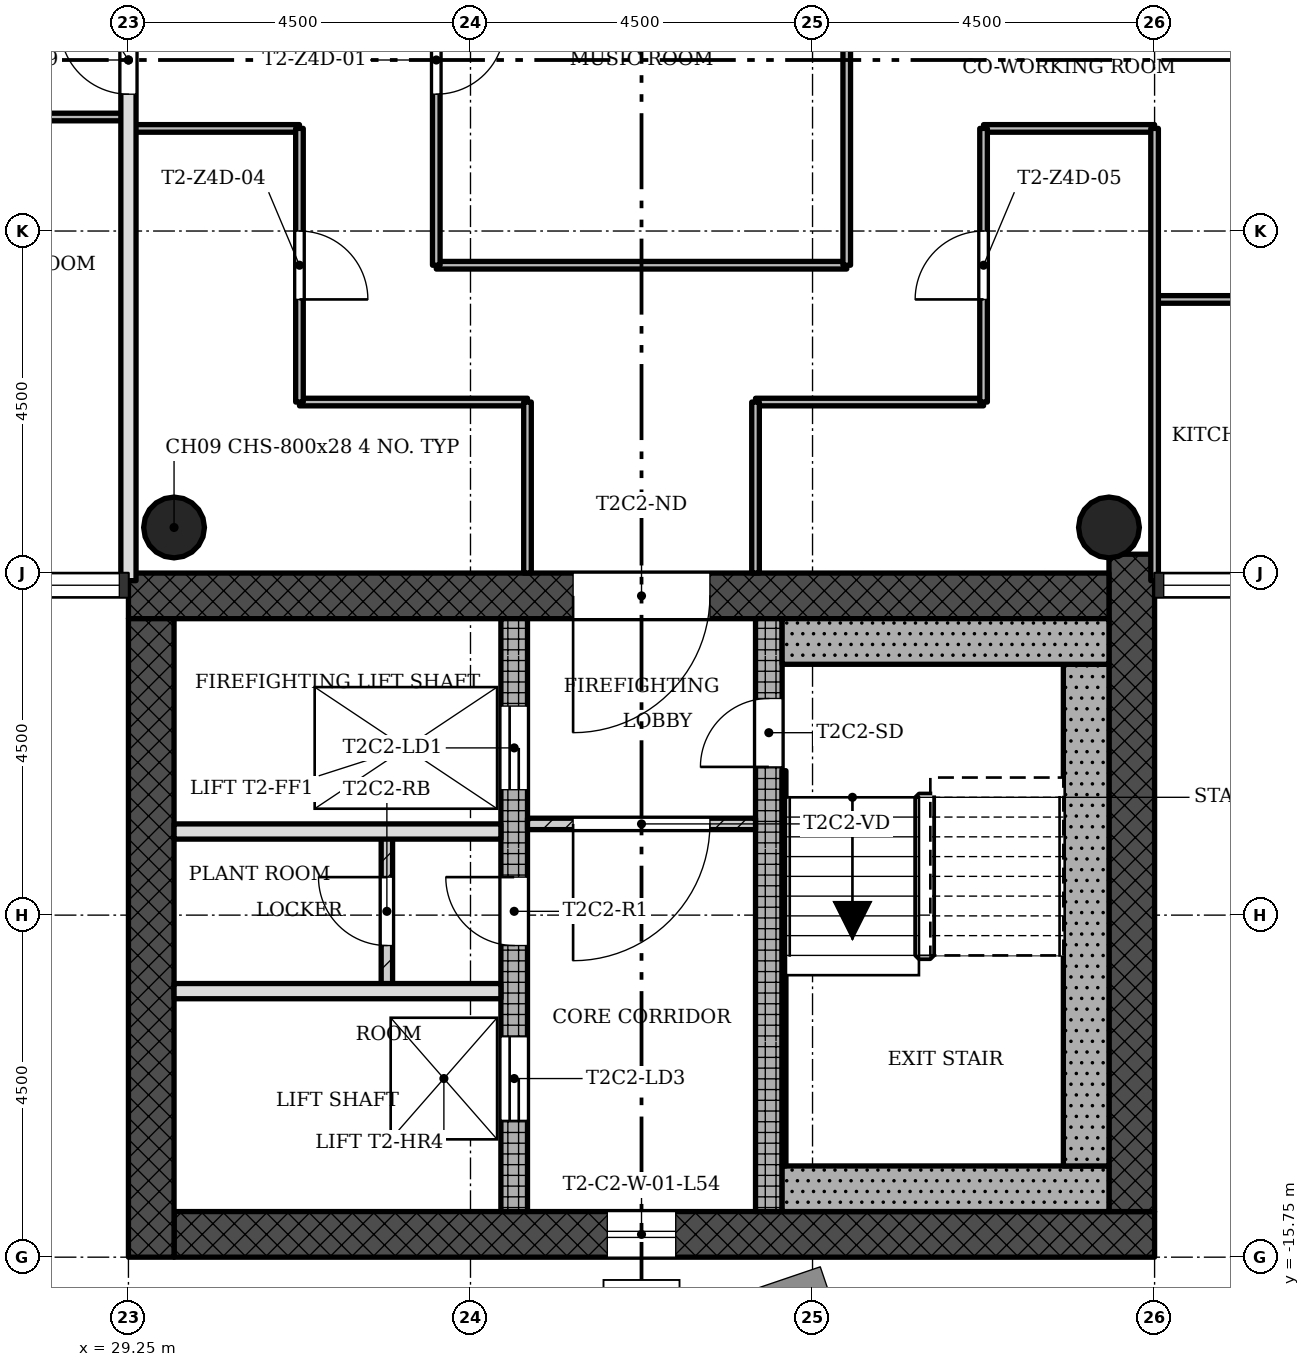
"""IFC4 building model, lengths in metres.
Left out: names, types, materials, properties, quantities, classifications, styles, units other than length and angle.
Written with IfcOpenShell. Run it as: python <this file> out.ifc"""

import sys

from ifc_helpers import new_model, si_unit, direction, frame, frame_2d, origin, origin_2d, place, context, subcontext, project, spatial, rectangle, hollow_circle, extrude, element, fill, save


model = new_model("IFC4")
c1 = context("Model", 3, precision=1e-05, world=origin(), true_north=direction((0.0, 1.0)))
c2 = subcontext(c1, "Body", "Model", "MODEL_VIEW")
j1 = project(units=[si_unit("LENGTHUNIT", "METRE"), si_unit("PLANEANGLEUNIT", "RADIAN")], contexts=[c1])
p1 = place(None, origin())
s1 = spatial("IfcSite", under=j1, at=p1, CompositionType="ELEMENT")
p2 = place(p1, origin())
s2 = spatial("IfcBuilding", under=s1, at=p2, CompositionType="ELEMENT")
p3 = place(p2, frame((0.0, 0.0, 196.0)))
s3 = spatial("IfcBuildingStorey", under=s2, at=p3, CompositionType="ELEMENT", Elevation=196.0)
p4 = place(p3, frame((29.85, -15.45, 0.0), z_axis=(0.0, 0.0, 1.0), x_axis=(1.0, 0.0, 0.0)))
e1 = element("IfcWall", 1, at=p4, inside=s3, PredefinedType="SHEAR", context=c2, shape_type="SweptSolid", body=[
    extrude(rectangle(XDim=12.9, YDim=0.6, at=frame_2d((6.45, 0.0))), origin(), (0.0, 0.0, 1.0), 3.4),
])
p5 = place(p4, frame((5.7, 0.0, 0.45)))
e2 = element("IfcOpeningElement", 2, at=p5, cuts=e1, PredefinedType="OPENING", context=c2, shape_type="SweptSolid", body=[
    extrude(rectangle(XDim=0.9, YDim=2.4, at=frame_2d((0.45, 1.2))), frame((0.0, 0.31, 0.0), z_axis=(0.0, -1.0, 0.0), x_axis=(1.0, 0.0, 0.0)), (0.0, 0.0, 1.0), 0.62),
])
p6 = place(p3, frame((42.45, -15.15, 0.0), z_axis=(0.0, 0.0, 1.0), x_axis=(0.0, 1.0, 0.0)))
e3 = element("IfcWall", 3, at=p6, inside=s3, PredefinedType="SHEAR", context=c2, shape_type="SweptSolid", body=[
    extrude(rectangle(XDim=8.648, YDim=0.6, at=frame_2d((4.324, 0.0))), origin(), (0.0, 0.0, 1.0), 3.4),
])
p7 = place(p3, frame((42.15, -7.05, 0.0), z_axis=(0.0, 0.0, 1.0), x_axis=(-1.0, 0.0, 0.0)))
e4 = element("IfcWall", 4, at=p7, inside=s3, PredefinedType="SHEAR", context=c2, shape_type="SweptSolid", body=[
    extrude(rectangle(XDim=12.9, YDim=0.6, at=frame_2d((6.45, 0.0))), origin(), (0.0, 0.0, 1.0), 3.4),
])
p8 = place(p7, frame((5.25, 0.0, 0.0)))
e5 = element("IfcOpeningElement", 5, at=p8, cuts=e4, PredefinedType="OPENING", context=c2, shape_type="SweptSolid", body=[
    extrude(rectangle(XDim=1.8, YDim=2.1, at=frame_2d((0.9, 1.05))), frame((0.0, 0.31, 0.0), z_axis=(0.0, -1.0, 0.0), x_axis=(1.0, 0.0, 0.0)), (0.0, 0.0, 1.0), 0.62),
])
p9 = place(p3, frame((29.55, -7.35, 0.0), z_axis=(0.0, 0.0, 1.0), x_axis=(0.0, -1.0, 0.0)))
e6 = element("IfcWall", 6, at=p9, inside=s3, PredefinedType="SHEAR", context=c2, shape_type="SweptSolid", body=[
    extrude(rectangle(XDim=8.4, YDim=0.6, at=frame_2d((4.2, 0.0))), origin(), (0.0, 0.0, 1.0), 3.4),
])
p10 = place(p3, frame((34.325, -15.15, 0.0), z_axis=(0.0, 0.0, 1.0), x_axis=(0.0, 1.0, 0.0)))
e7 = element("IfcWall", 7, at=p10, inside=s3, PredefinedType="SHEAR", context=c2, shape_type="SweptSolid", body=[
    extrude(rectangle(XDim=7.8, YDim=0.35, at=frame_2d((3.9, 0.0))), origin(), (0.0, 0.0, 1.0), 3.4),
])
p11 = place(p10, frame((5.55, 0.0, 0.0)))
e8 = element("IfcOpeningElement", 8, at=p11, cuts=e7, PredefinedType="OPENING", context=c2, shape_type="SweptSolid", body=[
    extrude(rectangle(XDim=1.1, YDim=2.1, at=frame_2d((0.55, 1.05))), frame((0.0, 0.185, 0.0), z_axis=(0.0, -1.0, 0.0), x_axis=(1.0, 0.0, 0.0)), (0.0, 0.0, 1.0), 0.37),
])
p12 = place(p10, frame((1.2, 0.0, 0.0)))
e9 = element("IfcOpeningElement", 9, at=p12, cuts=e7, PredefinedType="OPENING", context=c2, shape_type="SweptSolid", body=[
    extrude(rectangle(XDim=1.1, YDim=2.1, at=frame_2d((0.55, 1.05))), frame((0.0, 0.185, 0.0), z_axis=(0.0, -1.0, 0.0), x_axis=(1.0, 0.0, 0.0)), (0.0, 0.0, 1.0), 0.37),
])
p13 = place(p10, frame((3.5, 0.0, 0.0)))
e10 = element("IfcOpeningElement", 10, at=p13, cuts=e7, PredefinedType="OPENING", context=c2, shape_type="SweptSolid", body=[
    extrude(rectangle(XDim=0.9, YDim=2.1, at=frame_2d((0.45, 1.05))), frame((0.0, 0.185, 0.0), z_axis=(0.0, -1.0, 0.0), x_axis=(1.0, 0.0, 0.0)), (0.0, 0.0, 1.0), 0.37),
])
p14 = place(p3, frame((37.675, -15.15, 0.0), z_axis=(0.0, 0.0, 1.0), x_axis=(0.0, 1.0, 0.0)))
e11 = element("IfcWall", 11, at=p14, inside=s3, PredefinedType="SHEAR", context=c2, shape_type="SweptSolid", body=[
    extrude(rectangle(XDim=7.8, YDim=0.35, at=frame_2d((3.9, 0.0))), origin(), (0.0, 0.0, 1.0), 3.4),
])
p15 = place(p14, frame((5.85, 0.0, 0.0)))
e12 = element("IfcOpeningElement", 12, at=p15, cuts=e11, PredefinedType="OPENING", context=c2, shape_type="SweptSolid", body=[
    extrude(rectangle(XDim=0.9, YDim=2.1, at=frame_2d((0.45, 1.05))), frame((0.0, 0.185, 0.0), z_axis=(0.0, -1.0, 0.0), x_axis=(1.0, 0.0, 0.0)), (0.0, 0.0, 1.0), 0.37),
])
for number, where, z_axis, x_axis in (
    (13, (42.15, -6.15, 0.0), (0.0, 0.0, 1.0), (1.0, 0.0, 0.0)),
    (14, (29.85, -6.15, 0.0), (0.0, 0.0, 1.0), (1.0, 0.0, 0.0)),
):
    element("IfcColumn", number, at=place(p3, frame(where, z_axis=z_axis, x_axis=x_axis)), inside=s3, PredefinedType="COLUMN", context=c2, shape_type="SweptSolid", body=[
        extrude(hollow_circle(Radius=0.4, WallThickness=0.028, at=origin_2d()), origin(), (0.0, 0.0, 1.0), 3.4),
    ])
p16 = place(p3, frame((34.5, -10.05, 0.0), z_axis=(0.0, 0.0, 1.0), x_axis=(1.0, 0.0, 0.0)))
e15 = element("IfcWall", 15, at=p16, inside=s3, PredefinedType="PARTITIONING", context=c2, shape_type="SweptSolid", body=[
    extrude(rectangle(XDim=3.0, YDim=0.15, at=frame_2d((1.5, 0.0))), origin(), (0.0, 0.0, 1.0), 3.0),
])
p17 = place(p16, frame((0.6, 0.0, 0.0)))
e16 = element("IfcOpeningElement", 16, at=p17, cuts=e15, PredefinedType="OPENING", context=c2, shape_type="SweptSolid", body=[
    extrude(rectangle(XDim=1.8, YDim=2.1, at=frame_2d((0.9, 1.05))), frame((0.0, 0.085, 0.0), z_axis=(0.0, -1.0, 0.0), x_axis=(1.0, 0.0, 0.0)), (0.0, 0.0, 1.0), 0.17),
])
for number, where, z_axis, x_axis in (
    (17, (29.85, -12.25, 0.0), (0.0, 0.0, 1.0), (1.0, 0.0, 0.0)),
    (18, (29.85, -10.15, 0.0), (0.0, 0.0, 1.0), (1.0, 0.0, 0.0)),
):
    element("IfcWall", number, at=place(p3, frame(where, z_axis=z_axis, x_axis=x_axis)), inside=s3, PredefinedType="SOLIDWALL", context=c2, shape_type="SweptSolid", body=[
        extrude(rectangle(XDim=4.3, YDim=0.2, at=frame_2d((2.15, 0.0))), origin(), (0.0, 0.0, 1.0), 3.0),
    ])
p18 = place(p3, frame((32.65, -10.15, 0.0), z_axis=(0.0, 0.0, 1.0), x_axis=(0.0, -1.0, 0.0)))
e19 = element("IfcWall", 19, at=p18, inside=s3, PredefinedType="PARTITIONING", context=c2, shape_type="SweptSolid", body=[
    extrude(rectangle(XDim=2.1, YDim=0.15, at=frame_2d((1.05, 0.0))), origin(), (0.0, 0.0, 1.0), 3.0),
])
p19 = place(p18, frame((0.6, 0.0, 0.0)))
e20 = element("IfcOpeningElement", 20, at=p19, cuts=e19, PredefinedType="OPENING", context=c2, shape_type="SweptSolid", body=[
    extrude(rectangle(XDim=0.9, YDim=2.1, at=frame_2d((0.45, 1.05))), frame((0.0, 0.085, 0.0), z_axis=(0.0, -1.0, 0.0), x_axis=(1.0, 0.0, 0.0)), (0.0, 0.0, 1.0), 0.17),
])
for number, where, z_axis, x_axis in (
    (21, (40.5, -4.5, 0.0), (0.0, 0.0, 1.0), (-1.0, 0.0, 0.0)),
    (22, (34.5, -4.5, 0.0), (0.0, 0.0, 1.0), (-1.0, 0.0, 0.0)),
):
    element("IfcWall", number, at=place(p3, frame(where, z_axis=z_axis, x_axis=x_axis)), inside=s3, PredefinedType="PARTITIONING", context=c2, shape_type="SweptSolid", body=[
        extrude(rectangle(XDim=3.0, YDim=0.1, at=frame_2d((1.5, 0.0))), origin(), (0.0, 0.0, 1.0), 3.0),
    ])
p20 = place(p3, frame((47.25, -3.15, 0.0), z_axis=(0.0, 0.0, 1.0), x_axis=(-1.0, 0.0, 0.0)))
e23 = element("IfcWall", 23, at=p20, inside=s3, PredefinedType="PARTITIONING", context=c2, shape_type="SweptSolid", body=[
    extrude(rectangle(XDim=4.5, YDim=0.1, at=frame_2d((2.25, 0.0))), origin(), (0.0, 0.0, 1.0), 3.0),
])
p21 = place(p20, frame((1.8, 0.0, 0.0)))
e24 = element("IfcOpeningElement", 24, at=p21, cuts=e23, PredefinedType="OPENING", context=c2, shape_type="SweptSolid", body=[
    extrude(rectangle(XDim=0.9, YDim=2.1, at=frame_2d((0.45, 1.05))), frame((0.0, 0.06, 0.0), z_axis=(0.0, -1.0, 0.0), x_axis=(1.0, 0.0, 0.0)), (0.0, 0.0, 1.0), 0.12),
])
p22 = place(p3, frame((38.7, -2.7, 0.0), z_axis=(0.0, 0.0, 1.0), x_axis=(-1.0, 0.0, 0.0)))
e25 = element("IfcWall", 25, at=p22, inside=s3, PredefinedType="PARTITIONING", context=c2, shape_type="SweptSolid", body=[
    extrude(rectangle(XDim=5.4, YDim=0.1, at=frame_2d((2.7, 0.0))), origin(), (0.0, 0.0, 1.0), 3.0),
])
for number, where, z_axis, x_axis in (
    (26, (42.75, -0.9, 0.0), (0.0, 0.0, 1.0), (-1.0, 0.0, 0.0)),
    (27, (31.5, -0.9, 0.0), (0.0, 0.0, 1.0), (-1.0, 0.0, 0.0)),
):
    element("IfcWall", number, at=place(p3, frame(where, z_axis=z_axis, x_axis=x_axis)), inside=s3, PredefinedType="PARTITIONING", context=c2, shape_type="SweptSolid", body=[
        extrude(rectangle(XDim=2.25, YDim=0.1, at=frame_2d((1.125, 0.0))), origin(), (0.0, 0.0, 1.0), 3.0),
    ])
p23 = place(p3, frame((29.25, -0.75, 0.0), z_axis=(0.0, 0.0, 1.0), x_axis=(-1.0, 0.0, 0.0)))
e28 = element("IfcWall", 28, at=p23, inside=s3, PredefinedType="PARTITIONING", context=c2, shape_type="SweptSolid", body=[
    extrude(rectangle(XDim=4.5, YDim=0.1, at=frame_2d((2.25, 0.0))), origin(), (0.0, 0.0, 1.0), 3.0),
])
p24 = place(p23, frame((1.8, 0.0, 0.0)))
e29 = element("IfcOpeningElement", 29, at=p24, cuts=e28, PredefinedType="OPENING", context=c2, shape_type="SweptSolid", body=[
    extrude(rectangle(XDim=0.9, YDim=2.1, at=frame_2d((0.45, 1.05))), frame((0.0, 0.06, 0.0), z_axis=(0.0, -1.0, 0.0), x_axis=(1.0, 0.0, 0.0)), (0.0, 0.0, 1.0), 0.12),
])
p25 = place(p3, frame((42.75, -6.85, 0.0), z_axis=(0.0, 0.0, 1.0), x_axis=(0.0, 1.0, 0.0)))
e30 = element("IfcWall", 30, at=p25, inside=s3, PredefinedType="PARTITIONING", context=c2, shape_type="SweptSolid", body=[
    extrude(rectangle(XDim=5.95, YDim=0.1, at=frame_2d((2.975, 0.0))), origin(), (0.0, 0.0, 1.0), 3.0),
])
p26 = place(p3, frame((40.5, -4.5, 0.0), z_axis=(0.0, 0.0, 1.0), x_axis=(0.0, 1.0, 0.0)))
e31 = element("IfcWall", 31, at=p26, inside=s3, PredefinedType="PARTITIONING", context=c2, shape_type="SweptSolid", body=[
    extrude(rectangle(XDim=3.6, YDim=0.1, at=frame_2d((1.8, 0.0))), origin(), (0.0, 0.0, 1.0), 3.0),
])
p27 = place(p26, frame((1.35, 0.0, 0.0)))
e32 = element("IfcOpeningElement", 32, at=p27, cuts=e31, PredefinedType="OPENING", context=c2, shape_type="SweptSolid", body=[
    extrude(rectangle(XDim=0.9, YDim=2.1, at=frame_2d((0.45, 1.05))), frame((0.0, 0.06, 0.0), z_axis=(0.0, -1.0, 0.0), x_axis=(1.0, 0.0, 0.0)), (0.0, 0.0, 1.0), 0.12),
])
p28 = place(p3, frame((38.7, -2.7, 0.0), z_axis=(0.0, 0.0, 1.0), x_axis=(0.0, 1.0, 0.0)))
e33 = element("IfcWall", 33, at=p28, inside=s3, PredefinedType="PARTITIONING", context=c2, shape_type="SweptSolid", body=[
    extrude(rectangle(XDim=5.4, YDim=0.1, at=frame_2d((2.7, 0.0))), origin(), (0.0, 0.0, 1.0), 3.0),
])
for number, where, z_axis, x_axis in (
    (34, (37.5, -6.75, 0.0), (0.0, 0.0, 1.0), (0.0, 1.0, 0.0)),
    (35, (34.5, -6.75, 0.0), (0.0, 0.0, 1.0), (0.0, 1.0, 0.0)),
):
    element("IfcWall", number, at=place(p3, frame(where, z_axis=z_axis, x_axis=x_axis)), inside=s3, PredefinedType="PARTITIONING", context=c2, shape_type="SweptSolid", body=[
        extrude(rectangle(XDim=2.25, YDim=0.1, at=frame_2d((1.125, 0.0))), origin(), (0.0, 0.0, 1.0), 3.0),
    ])
p29 = place(p3, frame((33.3, -2.7, 0.0), z_axis=(0.0, 0.0, 1.0), x_axis=(0.0, 1.0, 0.0)))
e36 = element("IfcWall", 36, at=p29, inside=s3, PredefinedType="PARTITIONING", context=c2, shape_type="SweptSolid", body=[
    extrude(rectangle(XDim=5.4, YDim=0.1, at=frame_2d((2.7, 0.0))), origin(), (0.0, 0.0, 1.0), 3.0),
])
p30 = place(p29, frame((2.25, 0.0, 0.0)))
e37 = element("IfcOpeningElement", 37, at=p30, cuts=e36, PredefinedType="OPENING", context=c2, shape_type="SweptSolid", body=[
    extrude(rectangle(XDim=0.9, YDim=2.1, at=frame_2d((0.45, 1.05))), frame((0.0, 0.06, 0.0), z_axis=(0.0, -1.0, 0.0), x_axis=(1.0, 0.0, 0.0)), (0.0, 0.0, 1.0), 0.12),
])
p31 = place(p3, frame((31.5, -4.5, 0.0), z_axis=(0.0, 0.0, 1.0), x_axis=(0.0, 1.0, 0.0)))
e38 = element("IfcWall", 38, at=p31, inside=s3, PredefinedType="PARTITIONING", context=c2, shape_type="SweptSolid", body=[
    extrude(rectangle(XDim=3.6, YDim=0.1, at=frame_2d((1.8, 0.0))), origin(), (0.0, 0.0, 1.0), 3.0),
])
p32 = place(p31, frame((1.35, 0.0, 0.0)))
e39 = element("IfcOpeningElement", 39, at=p32, cuts=e38, PredefinedType="OPENING", context=c2, shape_type="SweptSolid", body=[
    extrude(rectangle(XDim=0.9, YDim=2.1, at=frame_2d((0.45, 1.05))), frame((0.0, 0.06, 0.0), z_axis=(0.0, -1.0, 0.0), x_axis=(1.0, 0.0, 0.0)), (0.0, 0.0, 1.0), 0.12),
])
p33 = place(p3, frame((29.25, -6.85, 0.0), z_axis=(0.0, 0.0, 1.0), x_axis=(0.0, 1.0, 0.0)))
e40 = element("IfcWall", 40, at=p33, inside=s3, PredefinedType="SOLIDWALL", context=c2, shape_type="SweptSolid", body=[
    extrude(rectangle(XDim=13.7, YDim=0.2, at=frame_2d((6.85, 0.0))), origin(), (0.0, 0.0, 1.0), 3.0),
])
p34 = place(p33, frame((6.4, 0.0, 0.0)))
e41 = element("IfcOpeningElement", 41, at=p34, cuts=e40, PredefinedType="OPENING", context=c2, shape_type="SweptSolid", body=[
    extrude(rectangle(XDim=0.9, YDim=2.1, at=frame_2d((0.45, 1.05))), frame((0.0, 0.11, 0.0), z_axis=(0.0, -1.0, 0.0), x_axis=(1.0, 0.0, 0.0)), (0.0, 0.0, 1.0), 0.22),
])
p35 = place(p3, frame((37.85, -14.85, 0.0), z_axis=(0.0, 0.0, 1.0), x_axis=(1.0, 0.0, 0.0)))
e42 = element("IfcWall", 42, at=p35, inside=s3, PredefinedType="SHEAR", context=c2, shape_type="SweptSolid", body=[
    extrude(rectangle(XDim=4.3, YDim=0.6, at=frame_2d((2.15, 0.0))), origin(), (0.0, 0.0, 1.0), 3.4),
])
p36 = place(p3, frame((41.85, -7.95, 0.0), z_axis=(0.0, 0.0, 1.0), x_axis=(0.0, -1.0, 0.0)))
e43 = element("IfcWall", 43, at=p36, inside=s3, PredefinedType="SHEAR", context=c2, shape_type="SweptSolid", body=[
    extrude(rectangle(XDim=6.6, YDim=0.6, at=frame_2d((3.3, 0.0))), origin(), (0.0, 0.0, 1.0), 3.4),
])
p37 = place(p3, frame((37.85, -7.65, 0.0), z_axis=(0.0, 0.0, 1.0), x_axis=(1.0, 0.0, 0.0)))
e44 = element("IfcWall", 44, at=p37, inside=s3, PredefinedType="SHEAR", context=c2, shape_type="SweptSolid", body=[
    extrude(rectangle(XDim=4.3, YDim=0.6, at=frame_2d((2.15, 0.0))), origin(), (0.0, 0.0, 1.0), 3.4),
])
p38 = place(p3, frame((37.875, -9.35, 0.0), z_axis=(0.0, 0.0, 1.0), x_axis=(0.0, -1.0, 0.0)))
e45 = element("IfcWall", 45, at=p38, inside=s3, PredefinedType="SHEAR", context=c2, shape_type="SweptSolid", body=[
    extrude(rectangle(XDim=5.2, YDim=0.05, at=frame_2d((2.6, 0.0))), origin(), (0.0, 0.0, 1.0), 3.4),
])
p39 = place(p5, origin())
e46 = element("IfcWindow", 46, at=p39, inside=s3, PartitioningType="SINGLE_PANEL", PredefinedType="WINDOW", context=c2, shape_type="SweptSolid", body=[
    extrude(rectangle(XDim=0.9, YDim=2.4, at=frame_2d((0.45, 1.2))), frame((0.0, 0.03, 0.0), z_axis=(0.0, -1.0, 0.0), x_axis=(1.0, 0.0, 0.0)), (0.0, 0.0, 1.0), 0.06),
])
fill(e2, e46)
p40 = place(p17, origin())
e47 = element("IfcDoor", 47, at=p40, inside=s3, OperationType="SINGLE_SWING_LEFT", PredefinedType="DOOR", context=c2, shape_type="SweptSolid", body=[
    extrude(rectangle(XDim=1.8, YDim=2.1, at=frame_2d((0.9, 1.05))), frame((0.0, 0.025, 0.0), z_axis=(0.0, -1.0, 0.0), x_axis=(1.0, 0.0, 0.0)), (0.0, 0.0, 1.0), 0.05),
])
fill(e16, e47)
p41 = place(p19, origin())
e48 = element("IfcDoor", 48, at=p41, inside=s3, OperationType="SINGLE_SWING_LEFT", PredefinedType="DOOR", context=c2, shape_type="SweptSolid", body=[
    extrude(rectangle(XDim=0.9, YDim=2.1, at=frame_2d((0.45, 1.05))), frame((0.0, 0.025, 0.0), z_axis=(0.0, -1.0, 0.0), x_axis=(1.0, 0.0, 0.0)), (0.0, 0.0, 1.0), 0.05),
])
fill(e20, e48)
p42 = place(p30, origin())
e49 = element("IfcDoor", 49, at=p42, inside=s3, OperationType="SINGLE_SWING_RIGHT", PredefinedType="DOOR", context=c2, shape_type="SweptSolid", body=[
    extrude(rectangle(XDim=0.9, YDim=2.1, at=frame_2d((0.45, 1.05))), frame((0.0, 0.025, 0.0), z_axis=(0.0, -1.0, 0.0), x_axis=(1.0, 0.0, 0.0)), (0.0, 0.0, 1.0), 0.05),
])
fill(e37, e49)
p43 = place(p32, origin())
e50 = element("IfcDoor", 50, at=p43, inside=s3, OperationType="SINGLE_SWING_LEFT", PredefinedType="DOOR", context=c2, shape_type="SweptSolid", body=[
    extrude(rectangle(XDim=0.9, YDim=2.1, at=frame_2d((0.45, 1.05))), frame((0.0, 0.025, 0.0), z_axis=(0.0, -1.0, 0.0), x_axis=(1.0, 0.0, 0.0)), (0.0, 0.0, 1.0), 0.05),
])
fill(e39, e50)
p44 = place(p27, origin())
e51 = element("IfcDoor", 51, at=p44, inside=s3, OperationType="SINGLE_SWING_RIGHT", PredefinedType="DOOR", context=c2, shape_type="SweptSolid", body=[
    extrude(rectangle(XDim=0.9, YDim=2.1, at=frame_2d((0.45, 1.05))), frame((0.0, 0.025, 0.0), z_axis=(0.0, -1.0, 0.0), x_axis=(1.0, 0.0, 0.0)), (0.0, 0.0, 1.0), 0.05),
])
fill(e32, e51)
p45 = place(p34, origin())
e52 = element("IfcDoor", 52, at=p45, inside=s3, OperationType="SINGLE_SWING_LEFT", PredefinedType="DOOR", context=c2, shape_type="SweptSolid", body=[
    extrude(rectangle(XDim=0.9, YDim=2.1, at=frame_2d((0.45, 1.05))), frame((0.0, 0.025, 0.0), z_axis=(0.0, -1.0, 0.0), x_axis=(1.0, 0.0, 0.0)), (0.0, 0.0, 1.0), 0.05),
])
fill(e41, e52)
p46 = place(p15, origin())
e53 = element("IfcDoor", 53, at=p46, inside=s3, OperationType="SINGLE_SWING_RIGHT", PredefinedType="DOOR", context=c2, shape_type="SweptSolid", body=[
    extrude(rectangle(XDim=0.9, YDim=2.1, at=frame_2d((0.45, 1.05))), frame((0.0, 0.025, 0.0), z_axis=(0.0, -1.0, 0.0), x_axis=(1.0, 0.0, 0.0)), (0.0, 0.0, 1.0), 0.05),
])
fill(e12, e53)
p47 = place(p11, origin())
e54 = element("IfcDoor", 54, at=p47, inside=s3, OperationType="SLIDING_TO_LEFT", PredefinedType="DOOR", context=c2, shape_type="SweptSolid", body=[
    extrude(rectangle(XDim=1.1, YDim=2.1, at=frame_2d((0.55, 1.05))), frame((0.0, 0.025, 0.0), z_axis=(0.0, -1.0, 0.0), x_axis=(1.0, 0.0, 0.0)), (0.0, 0.0, 1.0), 0.05),
])
fill(e8, e54)
p48 = place(p12, origin())
e55 = element("IfcDoor", 55, at=p48, inside=s3, OperationType="SLIDING_TO_LEFT", PredefinedType="DOOR", context=c2, shape_type="SweptSolid", body=[
    extrude(rectangle(XDim=1.1, YDim=2.1, at=frame_2d((0.55, 1.05))), frame((0.0, 0.025, 0.0), z_axis=(0.0, -1.0, 0.0), x_axis=(1.0, 0.0, 0.0)), (0.0, 0.0, 1.0), 0.05),
])
fill(e9, e55)
p49 = place(p13, origin())
e56 = element("IfcDoor", 56, at=p49, inside=s3, OperationType="SINGLE_SWING_LEFT", PredefinedType="DOOR", context=c2, shape_type="SweptSolid", body=[
    extrude(rectangle(XDim=0.9, YDim=2.1, at=frame_2d((0.45, 1.05))), frame((0.0, 0.025, 0.0), z_axis=(0.0, -1.0, 0.0), x_axis=(1.0, 0.0, 0.0)), (0.0, 0.0, 1.0), 0.05),
])
fill(e10, e56)
p50 = place(p8, origin())
e57 = element("IfcDoor", 57, at=p50, inside=s3, OperationType="SINGLE_SWING_LEFT", PredefinedType="DOOR", context=c2, shape_type="SweptSolid", body=[
    extrude(rectangle(XDim=1.8, YDim=2.1, at=frame_2d((0.9, 1.05))), frame((0.0, 0.025, 0.0), z_axis=(0.0, -1.0, 0.0), x_axis=(1.0, 0.0, 0.0)), (0.0, 0.0, 1.0), 0.05),
])
fill(e5, e57)
save(model, sys.argv[1])
